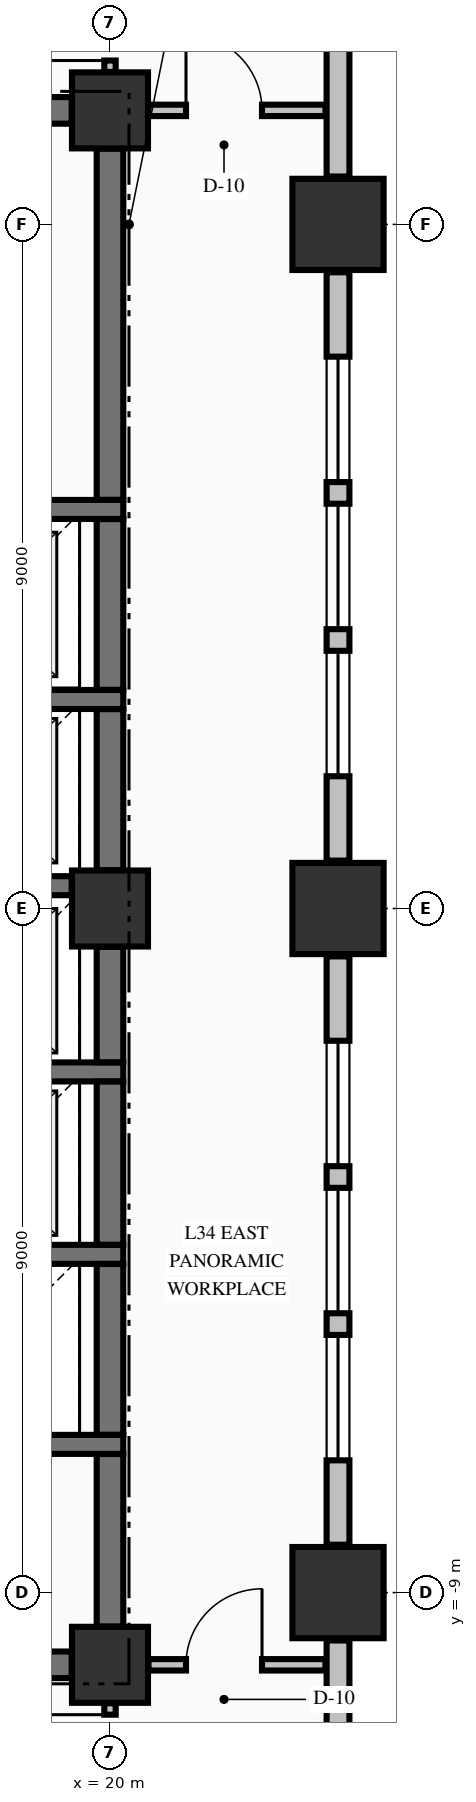
"""IFC4 building model, lengths in metres.
Left out: names, types, materials, properties, quantities, classifications, styles, units other than length and angle.
Written with IfcOpenShell. Run it as: python <this file> out.ifc"""

import sys

from ifc_helpers import new_model, si_unit, direction, frame, frame_2d, origin, origin_2d, place, context, subcontext, project, spatial, rectangle, extrude, element, fill, save


model = new_model("IFC4")
c1 = context("Model", 3, precision=1e-05, world=origin(), true_north=direction((0.0, 1.0)))
c2 = subcontext(c1, "Body", "Model", "MODEL_VIEW")
j1 = project(units=[si_unit("LENGTHUNIT", "METRE"), si_unit("PLANEANGLEUNIT", "RADIAN")], contexts=[c1])
p1 = place(None, origin())
s1 = spatial("IfcSite", under=j1, at=p1, CompositionType="ELEMENT")
p2 = place(p1, origin())
s2 = spatial("IfcBuilding", under=s1, at=p2, CompositionType="ELEMENT")
p3 = place(p2, frame((0.0, 0.0, 135.63)))
s3 = spatial("IfcBuildingStorey", under=s2, at=p3, CompositionType="ELEMENT", Elevation=135.63)
for number, where, z_axis, x_axis in (
    (1, (23.0, -9.0, -0.25), (0.0, 0.0, 1.0), (1.0, 0.0, 0.0)),
    (2, (23.0, 0.0, -0.25), (0.0, 0.0, 1.0), (1.0, 0.0, 0.0)),
    (3, (23.0, 9.0, -0.25), (0.0, 0.0, 1.0), (1.0, 0.0, 0.0)),
):
    element("IfcColumn", number, at=place(p3, frame(where, z_axis=z_axis, x_axis=x_axis)), inside=s3, PredefinedType="COLUMN", context=c2, shape_type="SweptSolid", body=[
        extrude(rectangle(XDim=1.2, YDim=1.2, at=origin_2d()), origin(), (0.0, 0.0, 1.0), 3.57),
    ])
for number, where, z_axis, x_axis in (
    (4, (20.0, -9.95, -0.25), (0.0, 0.0, 1.0), (1.0, 0.0, 0.0)),
    (5, (20.0, 10.5, -0.25), (0.0, 0.0, 1.0), (1.0, 0.0, 0.0)),
    (6, (20.0, 0.0, -0.25), (0.0, 0.0, 1.0), (1.0, 0.0, 0.0)),
):
    element("IfcColumn", number, at=place(p3, frame(where, z_axis=z_axis, x_axis=x_axis)), inside=s3, PredefinedType="COLUMN", context=c2, shape_type="SweptSolid", body=[
        extrude(rectangle(XDim=1.0, YDim=1.0, at=origin_2d()), origin(), (0.0, 0.0, 1.0), 3.57),
    ])
p4 = place(p3, frame((23.0, -20.37, 0.0), z_axis=(0.0, 0.0, 1.0), x_axis=(0.0, 1.0, 0.0)))
e7 = element("IfcWall", 7, at=p4, inside=s3, PredefinedType="STANDARD", context=c2, shape_type="SweptSolid", body=[
    extrude(rectangle(XDim=10.74, YDim=0.3, at=frame_2d((5.37, 0.0))), origin(), (0.0, 0.0, 1.0), 2.712),
])
p5 = place(p3, frame((23.0, -8.37, 0.0), z_axis=(0.0, 0.0, 1.0), x_axis=(0.0, 1.0, 0.0)))
e8 = element("IfcWall", 8, at=p5, inside=s3, PredefinedType="STANDARD", context=c2, shape_type="SweptSolid", body=[
    extrude(rectangle(XDim=7.74, YDim=0.3, at=frame_2d((3.87, 0.0))), origin(), (0.0, 0.0, 1.0), 2.712),
])
p6 = place(p5, frame((1.11, 0.0, 0.8)))
e9 = element("IfcOpeningElement", 9, at=p6, cuts=e8, PredefinedType="OPENING", context=c2, shape_type="SweptSolid", body=[
    extrude(rectangle(XDim=1.65, YDim=1.7, at=frame_2d((0.825, 0.85))), frame((0.0, 0.16, 0.0), z_axis=(0.0, -1.0, 0.0), x_axis=(1.0, 0.0, 0.0)), (0.0, 0.0, 1.0), 0.32),
])
p7 = place(p5, frame((3.045, 0.0, 0.8)))
e10 = element("IfcOpeningElement", 10, at=p7, cuts=e8, PredefinedType="OPENING", context=c2, shape_type="SweptSolid", body=[
    extrude(rectangle(XDim=1.65, YDim=1.7, at=frame_2d((0.825, 0.85))), frame((0.0, 0.16, 0.0), z_axis=(0.0, -1.0, 0.0), x_axis=(1.0, 0.0, 0.0)), (0.0, 0.0, 1.0), 0.32),
])
p8 = place(p5, frame((4.98, 0.0, 0.8)))
e11 = element("IfcOpeningElement", 11, at=p8, cuts=e8, PredefinedType="OPENING", context=c2, shape_type="SweptSolid", body=[
    extrude(rectangle(XDim=1.65, YDim=1.7, at=frame_2d((0.825, 0.85))), frame((0.0, 0.16, 0.0), z_axis=(0.0, -1.0, 0.0), x_axis=(1.0, 0.0, 0.0)), (0.0, 0.0, 1.0), 0.32),
])
p9 = place(p3, frame((23.0, 0.63, 0.0), z_axis=(0.0, 0.0, 1.0), x_axis=(0.0, 1.0, 0.0)))
e12 = element("IfcWall", 12, at=p9, inside=s3, PredefinedType="STANDARD", context=c2, shape_type="SweptSolid", body=[
    extrude(rectangle(XDim=7.74, YDim=0.3, at=frame_2d((3.87, 0.0))), origin(), (0.0, 0.0, 1.0), 2.712),
])
p10 = place(p9, frame((1.11, 0.0, 0.8)))
e13 = element("IfcOpeningElement", 13, at=p10, cuts=e12, PredefinedType="OPENING", context=c2, shape_type="SweptSolid", body=[
    extrude(rectangle(XDim=1.65, YDim=1.7, at=frame_2d((0.825, 0.85))), frame((0.0, 0.16, 0.0), z_axis=(0.0, -1.0, 0.0), x_axis=(1.0, 0.0, 0.0)), (0.0, 0.0, 1.0), 0.32),
])
p11 = place(p9, frame((3.045, 0.0, 0.8)))
e14 = element("IfcOpeningElement", 14, at=p11, cuts=e12, PredefinedType="OPENING", context=c2, shape_type="SweptSolid", body=[
    extrude(rectangle(XDim=1.65, YDim=1.7, at=frame_2d((0.825, 0.85))), frame((0.0, 0.16, 0.0), z_axis=(0.0, -1.0, 0.0), x_axis=(1.0, 0.0, 0.0)), (0.0, 0.0, 1.0), 0.32),
])
p12 = place(p9, frame((4.98, 0.0, 0.8)))
e15 = element("IfcOpeningElement", 15, at=p12, cuts=e12, PredefinedType="OPENING", context=c2, shape_type="SweptSolid", body=[
    extrude(rectangle(XDim=1.65, YDim=1.7, at=frame_2d((0.825, 0.85))), frame((0.0, 0.16, 0.0), z_axis=(0.0, -1.0, 0.0), x_axis=(1.0, 0.0, 0.0)), (0.0, 0.0, 1.0), 0.32),
])
p13 = place(p3, frame((23.0, 9.63, 0.0), z_axis=(0.0, 0.0, 1.0), x_axis=(0.0, 1.0, 0.0)))
e16 = element("IfcWall", 16, at=p13, inside=s3, PredefinedType="STANDARD", context=c2, shape_type="SweptSolid", body=[
    extrude(rectangle(XDim=10.74, YDim=0.3, at=frame_2d((5.37, 0.0))), origin(), (0.0, 0.0, 1.0), 2.712),
])
p14 = place(p3, frame((14.7, -9.95, 0.0), z_axis=(0.0, 0.0, 1.0), x_axis=(1.0, 0.0, 0.0)))
e17 = element("IfcWall", 17, at=p14, inside=s3, PredefinedType="SHEAR", context=c2, shape_type="SweptSolid", body=[
    extrude(rectangle(XDim=4.796, YDim=0.35, at=frame_2d((2.398, 0.0))), origin(), (0.0, 0.0, 1.0), 3.32),
])
p15 = place(p14, frame((0.65, 0.0, 0.0)))
e18 = element("IfcOpeningElement", 18, at=p15, cuts=e17, PredefinedType="OPENING", context=c2, shape_type="SweptSolid", body=[
    extrude(rectangle(XDim=1.2, YDim=2.15, at=frame_2d((0.6, 1.075))), frame((0.0, 0.185, 0.0), z_axis=(0.0, -1.0, 0.0), x_axis=(1.0, 0.0, 0.0)), (0.0, 0.0, 1.0), 0.37),
])
for number, where, z_axis, x_axis in (
    (19, (17.025, -7.05, 0.0), (0.0, 0.0, 1.0), (1.0, 0.0, 0.0)),
    (20, (17.025, -4.55, 0.0), (0.0, 0.0, 1.0), (1.0, 0.0, 0.0)),
    (21, (17.025, -2.15, 0.0), (0.0, 0.0, 1.0), (1.0, 0.0, 0.0)),
):
    element("IfcWall", number, at=place(p3, frame(where, z_axis=z_axis, x_axis=x_axis)), inside=s3, PredefinedType="SOLIDWALL", context=c2, shape_type="SweptSolid", body=[
        extrude(rectangle(XDim=3.15, YDim=0.25, at=frame_2d((1.575, 0.0))), origin(), (0.0, 0.0, 1.0), 3.32),
    ])
p16 = place(p3, frame((17.025, 0.3, 0.0), z_axis=(0.0, 0.0, 1.0), x_axis=(1.0, 0.0, 0.0)))
e22 = element("IfcWall", 22, at=p16, inside=s3, PredefinedType="SOLIDWALL", context=c2, shape_type="SweptSolid", body=[
    extrude(rectangle(XDim=2.471, YDim=0.25, at=frame_2d((1.236, 0.0))), origin(), (0.0, 0.0, 1.0), 3.32),
])
for number, where, z_axis, x_axis in (
    (23, (17.025, 2.75, 0.0), (0.0, 0.0, 1.0), (1.0, 0.0, 0.0)),
    (24, (17.025, 5.25, 0.0), (0.0, 0.0, 1.0), (1.0, 0.0, 0.0)),
):
    element("IfcWall", number, at=place(p3, frame(where, z_axis=z_axis, x_axis=x_axis)), inside=s3, PredefinedType="SOLIDWALL", context=c2, shape_type="SweptSolid", body=[
        extrude(rectangle(XDim=3.15, YDim=0.25, at=frame_2d((1.575, 0.0))), origin(), (0.0, 0.0, 1.0), 3.32),
    ])
p17 = place(p3, frame((14.7, 10.5, 0.0), z_axis=(0.0, 0.0, 1.0), x_axis=(1.0, 0.0, 0.0)))
e25 = element("IfcWall", 25, at=p17, inside=s3, PredefinedType="SHEAR", context=c2, shape_type="SweptSolid", body=[
    extrude(rectangle(XDim=4.796, YDim=0.35, at=frame_2d((2.398, 0.0))), origin(), (0.0, 0.0, 1.0), 3.32),
])
p18 = place(p17, frame((0.65, 0.0, 0.0)))
e26 = element("IfcOpeningElement", 26, at=p18, cuts=e25, PredefinedType="OPENING", context=c2, shape_type="SweptSolid", body=[
    extrude(rectangle(XDim=1.2, YDim=2.15, at=frame_2d((0.6, 1.075))), frame((0.0, 0.185, 0.0), z_axis=(0.0, -1.0, 0.0), x_axis=(1.0, 0.0, 0.0)), (0.0, 0.0, 1.0), 0.37),
])
p19 = place(p17, frame((3.25, 0.0, 0.0)))
e27 = element("IfcOpeningElement", 27, at=p19, cuts=e25, PredefinedType="OPENING", context=c2, shape_type="SweptSolid", body=[
    extrude(rectangle(XDim=0.9, YDim=2.15, at=frame_2d((0.45, 1.075))), frame((0.0, 0.185, 0.0), z_axis=(0.0, -1.0, 0.0), x_axis=(1.0, 0.0, 0.0)), (0.0, 0.0, 1.0), 0.37),
])
p20 = place(p3, frame((20.506, -9.95, 0.0), z_axis=(0.0, 0.0, 1.0), x_axis=(1.0, 0.0, 0.0)))
e28 = element("IfcWall", 28, at=p20, inside=s3, PredefinedType="PARTITIONING", context=c2, shape_type="SweptSolid", body=[
    extrude(rectangle(XDim=2.329, YDim=0.15, at=frame_2d((1.165, 0.0))), origin(), (0.0, 0.0, 1.0), 3.32),
])
p21 = place(p20, frame((0.494, 0.0, 0.0)))
e29 = element("IfcOpeningElement", 29, at=p21, cuts=e28, PredefinedType="OPENING", context=c2, shape_type="SweptSolid", body=[
    extrude(rectangle(XDim=1.0, YDim=2.15, at=frame_2d((0.5, 1.075))), frame((0.0, 0.085, 0.0), z_axis=(0.0, -1.0, 0.0), x_axis=(1.0, 0.0, 0.0)), (0.0, 0.0, 1.0), 0.17),
])
p22 = place(p3, frame((20.506, 10.5, 0.0), z_axis=(0.0, 0.0, 1.0), x_axis=(1.0, 0.0, 0.0)))
e30 = element("IfcWall", 30, at=p22, inside=s3, PredefinedType="PARTITIONING", context=c2, shape_type="SweptSolid", body=[
    extrude(rectangle(XDim=2.329, YDim=0.15, at=frame_2d((1.165, 0.0))), origin(), (0.0, 0.0, 1.0), 3.32),
])
p23 = place(p22, frame((0.494, 0.0, 0.0)))
e31 = element("IfcOpeningElement", 31, at=p23, cuts=e30, PredefinedType="OPENING", context=c2, shape_type="SweptSolid", body=[
    extrude(rectangle(XDim=1.0, YDim=2.15, at=frame_2d((0.5, 1.075))), frame((0.0, 0.085, 0.0), z_axis=(0.0, -1.0, 0.0), x_axis=(1.0, 0.0, 0.0)), (0.0, 0.0, 1.0), 0.17),
])
p24 = place(p3, frame((20.0, -9.446, 0.0), z_axis=(0.0, 0.0, 1.0), x_axis=(0.0, 1.0, 0.0)))
e32 = element("IfcWall", 32, at=p24, inside=s3, PredefinedType="SHEAR", context=c2, shape_type="SweptSolid", body=[
    extrude(rectangle(XDim=2.269, YDim=0.35, at=frame_2d((1.135, 0.0))), origin(), (0.0, 0.0, 1.0), 3.32),
])
p25 = place(p3, frame((20.0, -6.923, 0.0), z_axis=(0.0, 0.0, 1.0), x_axis=(0.0, 1.0, 0.0)))
e33 = element("IfcWall", 33, at=p25, inside=s3, PredefinedType="SHEAR", context=c2, shape_type="SweptSolid", body=[
    extrude(rectangle(XDim=2.246, YDim=0.35, at=frame_2d((1.123, 0.0))), origin(), (0.0, 0.0, 1.0), 3.32),
])
p26 = place(p3, frame((20.0, -4.423, 0.0), z_axis=(0.0, 0.0, 1.0), x_axis=(0.0, 1.0, 0.0)))
e34 = element("IfcWall", 34, at=p26, inside=s3, PredefinedType="SHEAR", context=c2, shape_type="SweptSolid", body=[
    extrude(rectangle(XDim=2.146, YDim=0.35, at=frame_2d((1.073, 0.0))), origin(), (0.0, 0.0, 1.0), 3.32),
])
p27 = place(p3, frame((20.0, -2.023, 0.0), z_axis=(0.0, 0.0, 1.0), x_axis=(0.0, 1.0, 0.0)))
e35 = element("IfcWall", 35, at=p27, inside=s3, PredefinedType="SHEAR", context=c2, shape_type="SweptSolid", body=[
    extrude(rectangle(XDim=1.519, YDim=0.35, at=frame_2d((0.76, 0.0))), origin(), (0.0, 0.0, 1.0), 3.32),
])
p28 = place(p3, frame((20.0, 0.504, 0.0), z_axis=(0.0, 0.0, 1.0), x_axis=(0.0, 1.0, 0.0)))
e36 = element("IfcWall", 36, at=p28, inside=s3, PredefinedType="SHEAR", context=c2, shape_type="SweptSolid", body=[
    extrude(rectangle(XDim=2.119, YDim=0.35, at=frame_2d((1.06, 0.0))), origin(), (0.0, 0.0, 1.0), 3.32),
])
p29 = place(p3, frame((20.0, 2.877, 0.0), z_axis=(0.0, 0.0, 1.0), x_axis=(0.0, 1.0, 0.0)))
e37 = element("IfcWall", 37, at=p29, inside=s3, PredefinedType="SHEAR", context=c2, shape_type="SweptSolid", body=[
    extrude(rectangle(XDim=2.246, YDim=0.35, at=frame_2d((1.123, 0.0))), origin(), (0.0, 0.0, 1.0), 3.32),
])
p30 = place(p3, frame((20.0, 5.377, 0.0), z_axis=(0.0, 0.0, 1.0), x_axis=(0.0, 1.0, 0.0)))
e38 = element("IfcWall", 38, at=p30, inside=s3, PredefinedType="SHEAR", context=c2, shape_type="SweptSolid", body=[
    extrude(rectangle(XDim=4.619, YDim=0.35, at=frame_2d((2.31, 0.0))), origin(), (0.0, 0.0, 1.0), 3.32),
])
p31 = place(p3, frame((20.0, -12.122, 0.0), z_axis=(0.0, 0.0, 1.0), x_axis=(0.0, 1.0, 0.0)))
e39 = element("IfcWall", 39, at=p31, inside=s3, PredefinedType="PARTITIONING", context=c2, shape_type="SweptSolid", body=[
    extrude(rectangle(XDim=1.666, YDim=0.15, at=frame_2d((0.833, 0.0))), origin(), (0.0, 0.0, 1.0), 2.81),
])
p32 = place(p31, frame((0.566, 0.0, 0.0)))
e40 = element("IfcOpeningElement", 40, at=p32, cuts=e39, PredefinedType="OPENING", context=c2, shape_type="SweptSolid", body=[
    extrude(rectangle(XDim=0.95, YDim=2.15, at=frame_2d((0.475, 1.075))), frame((0.0, 0.085, 0.0), z_axis=(0.0, -1.0, 0.0), x_axis=(1.0, 0.0, 0.0)), (0.0, 0.0, 1.0), 0.17),
])
p33 = place(p3, frame((20.0, 11.006, 0.0), z_axis=(0.0, 0.0, 1.0), x_axis=(0.0, 1.0, 0.0)))
e41 = element("IfcWall", 41, at=p33, inside=s3, PredefinedType="PARTITIONING", context=c2, shape_type="SweptSolid", body=[
    extrude(rectangle(XDim=1.466, YDim=0.15, at=frame_2d((0.733, 0.0))), origin(), (0.0, 0.0, 1.0), 2.81),
])
p34 = place(p33, frame((0.15, 0.0, 0.0)))
e42 = element("IfcOpeningElement", 42, at=p34, cuts=e41, PredefinedType="OPENING", context=c2, shape_type="SweptSolid", body=[
    extrude(rectangle(XDim=0.95, YDim=2.15, at=frame_2d((0.475, 1.075))), frame((0.0, 0.085, 0.0), z_axis=(0.0, -1.0, 0.0), x_axis=(1.0, 0.0, 0.0)), (0.0, 0.0, 1.0), 0.17),
])
p35 = place(p6, origin())
e43 = element("IfcWindow", 43, at=p35, inside=s3, PartitioningType="SINGLE_PANEL", PredefinedType="WINDOW", context=c2, shape_type="SweptSolid", body=[
    extrude(rectangle(XDim=1.65, YDim=1.7, at=frame_2d((0.825, 0.85))), frame((0.0, 0.03, 0.0), z_axis=(0.0, -1.0, 0.0), x_axis=(1.0, 0.0, 0.0)), (0.0, 0.0, 1.0), 0.06),
])
fill(e9, e43)
p36 = place(p7, origin())
e44 = element("IfcWindow", 44, at=p36, inside=s3, PartitioningType="SINGLE_PANEL", PredefinedType="WINDOW", context=c2, shape_type="SweptSolid", body=[
    extrude(rectangle(XDim=1.65, YDim=1.7, at=frame_2d((0.825, 0.85))), frame((0.0, 0.03, 0.0), z_axis=(0.0, -1.0, 0.0), x_axis=(1.0, 0.0, 0.0)), (0.0, 0.0, 1.0), 0.06),
])
fill(e10, e44)
p37 = place(p8, origin())
e45 = element("IfcWindow", 45, at=p37, inside=s3, PartitioningType="SINGLE_PANEL", PredefinedType="WINDOW", context=c2, shape_type="SweptSolid", body=[
    extrude(rectangle(XDim=1.65, YDim=1.7, at=frame_2d((0.825, 0.85))), frame((0.0, 0.03, 0.0), z_axis=(0.0, -1.0, 0.0), x_axis=(1.0, 0.0, 0.0)), (0.0, 0.0, 1.0), 0.06),
])
fill(e11, e45)
p38 = place(p10, origin())
e46 = element("IfcWindow", 46, at=p38, inside=s3, PartitioningType="SINGLE_PANEL", PredefinedType="WINDOW", context=c2, shape_type="SweptSolid", body=[
    extrude(rectangle(XDim=1.65, YDim=1.7, at=frame_2d((0.825, 0.85))), frame((0.0, 0.03, 0.0), z_axis=(0.0, -1.0, 0.0), x_axis=(1.0, 0.0, 0.0)), (0.0, 0.0, 1.0), 0.06),
])
fill(e13, e46)
p39 = place(p11, origin())
e47 = element("IfcWindow", 47, at=p39, inside=s3, PartitioningType="SINGLE_PANEL", PredefinedType="WINDOW", context=c2, shape_type="SweptSolid", body=[
    extrude(rectangle(XDim=1.65, YDim=1.7, at=frame_2d((0.825, 0.85))), frame((0.0, 0.03, 0.0), z_axis=(0.0, -1.0, 0.0), x_axis=(1.0, 0.0, 0.0)), (0.0, 0.0, 1.0), 0.06),
])
fill(e14, e47)
p40 = place(p12, origin())
e48 = element("IfcWindow", 48, at=p40, inside=s3, PartitioningType="SINGLE_PANEL", PredefinedType="WINDOW", context=c2, shape_type="SweptSolid", body=[
    extrude(rectangle(XDim=1.65, YDim=1.7, at=frame_2d((0.825, 0.85))), frame((0.0, 0.03, 0.0), z_axis=(0.0, -1.0, 0.0), x_axis=(1.0, 0.0, 0.0)), (0.0, 0.0, 1.0), 0.06),
])
fill(e15, e48)
p41 = place(p34, origin())
e49 = element("IfcDoor", 49, at=p41, inside=s3, OperationType="SINGLE_SWING_LEFT", PredefinedType="DOOR", context=c2, shape_type="SweptSolid", body=[
    extrude(rectangle(XDim=0.95, YDim=2.15, at=frame_2d((0.475, 1.075))), frame((0.0, 0.025, 0.0), z_axis=(0.0, -1.0, 0.0), x_axis=(1.0, 0.0, 0.0)), (0.0, 0.0, 1.0), 0.05),
])
fill(e42, e49)
p42 = place(p32, origin())
e50 = element("IfcDoor", 50, at=p42, inside=s3, OperationType="SINGLE_SWING_RIGHT", PredefinedType="DOOR", context=c2, shape_type="SweptSolid", body=[
    extrude(rectangle(XDim=0.95, YDim=2.15, at=frame_2d((0.475, 1.075))), frame((0.0, 0.025, 0.0), z_axis=(0.0, -1.0, 0.0), x_axis=(1.0, 0.0, 0.0)), (0.0, 0.0, 1.0), 0.05),
])
fill(e40, e50)
p43 = place(p23, origin())
e51 = element("IfcDoor", 51, at=p43, inside=s3, OperationType="SINGLE_SWING_LEFT", PredefinedType="DOOR", context=c2, shape_type="SweptSolid", body=[
    extrude(rectangle(XDim=1.0, YDim=2.15, at=frame_2d((0.5, 1.075))), frame((0.0, 0.025, 0.0), z_axis=(0.0, -1.0, 0.0), x_axis=(1.0, 0.0, 0.0)), (0.0, 0.0, 1.0), 0.05),
])
fill(e31, e51)
p44 = place(p21, origin())
e52 = element("IfcDoor", 52, at=p44, inside=s3, OperationType="SINGLE_SWING_RIGHT", PredefinedType="DOOR", context=c2, shape_type="SweptSolid", body=[
    extrude(rectangle(XDim=1.0, YDim=2.15, at=frame_2d((0.5, 1.075))), frame((0.0, 0.025, 0.0), z_axis=(0.0, -1.0, 0.0), x_axis=(1.0, 0.0, 0.0)), (0.0, 0.0, 1.0), 0.05),
])
fill(e29, e52)
save(model, sys.argv[1])
